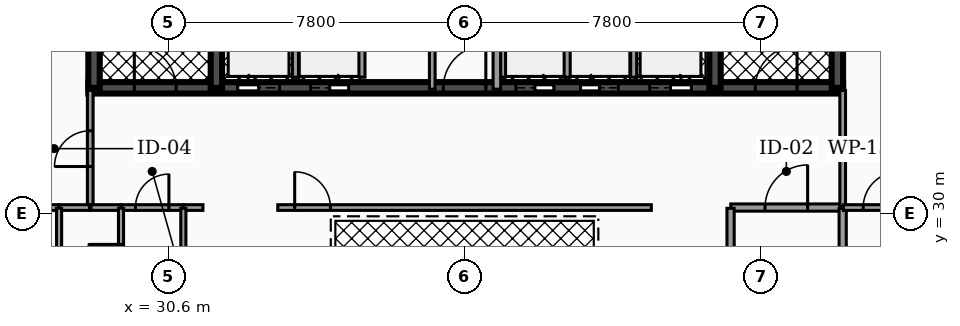
"""IFC4 building model, lengths in metres.
Left out: names, types, materials, properties, quantities, classifications, styles, units other than length and angle.
Written with IfcOpenShell. Run it as: python <this file> out.ifc"""

import sys

from ifc_helpers import new_model, si_unit, direction, frame, frame_2d, origin, place, context, subcontext, project, spatial, rectangle, extrude, element, fill, save


model = new_model("IFC4")
c1 = context("Model", 3, precision=1e-05, world=origin(), true_north=direction((0.0, 1.0)))
c2 = subcontext(c1, "Body", "Model", "MODEL_VIEW")
j1 = project(units=[si_unit("LENGTHUNIT", "METRE"), si_unit("PLANEANGLEUNIT", "RADIAN")], contexts=[c1])
p1 = place(None, origin())
s1 = spatial("IfcSite", under=j1, at=p1, CompositionType="ELEMENT")
p2 = place(p1, origin())
s2 = spatial("IfcBuilding", under=s1, at=p2, CompositionType="ELEMENT")
p3 = place(p2, frame((0.0, 0.0, 212.16)))
s3 = spatial("IfcBuildingStorey", under=s2, at=p3, CompositionType="ELEMENT", Elevation=212.16)
p4 = place(p3, frame((28.5, 33.3, 0.0), z_axis=(0.0, 0.0, 1.0), x_axis=(1.0, 0.0, 0.0)))
e1 = element("IfcWall", 1, at=p4, inside=s3, PredefinedType="SHEAR", context=c2, shape_type="SweptSolid", body=[
    extrude(rectangle(XDim=19.86, YDim=0.3, at=frame_2d((9.93, 0.0))), origin(), (0.0, 0.0, 1.0), 3.18),
])
p5 = place(p4, frame((3.93, 0.0, 0.0)))
e2 = element("IfcOpeningElement", 2, at=p5, cuts=e1, PredefinedType="OPENING", context=c2, shape_type="SweptSolid", body=[
    extrude(rectangle(XDim=1.1, YDim=2.15, at=frame_2d((0.55, 1.075))), frame((0.0, 0.16, 0.0), z_axis=(0.0, -1.0, 0.0), x_axis=(1.0, 0.0, 0.0)), (0.0, 0.0, 1.0), 0.32),
])
p6 = place(p4, frame((14.77, 0.0, 0.0)))
e3 = element("IfcOpeningElement", 3, at=p6, cuts=e1, PredefinedType="OPENING", context=c2, shape_type="SweptSolid", body=[
    extrude(rectangle(XDim=1.1, YDim=2.15, at=frame_2d((0.55, 1.075))), frame((0.0, 0.16, 0.0), z_axis=(0.0, -1.0, 0.0), x_axis=(1.0, 0.0, 0.0)), (0.0, 0.0, 1.0), 0.32),
])
p7 = place(p4, frame((11.25, 0.0, 0.0)))
e4 = element("IfcOpeningElement", 4, at=p7, cuts=e1, PredefinedType="OPENING", context=c2, shape_type="SweptSolid", body=[
    extrude(rectangle(XDim=1.0, YDim=2.1, at=frame_2d((0.5, 1.05))), frame((0.0, 0.16, 0.0), z_axis=(0.0, -1.0, 0.0), x_axis=(1.0, 0.0, 0.0)), (0.0, 0.0, 1.0), 0.32),
])
p8 = place(p4, frame((12.95, 0.0, 0.0)))
e5 = element("IfcOpeningElement", 5, at=p8, cuts=e1, PredefinedType="OPENING", context=c2, shape_type="SweptSolid", body=[
    extrude(rectangle(XDim=1.0, YDim=2.1, at=frame_2d((0.5, 1.05))), frame((0.0, 0.16, 0.0), z_axis=(0.0, -1.0, 0.0), x_axis=(1.0, 0.0, 0.0)), (0.0, 0.0, 1.0), 0.32),
])
p9 = place(p4, frame((5.85, 0.0, 0.0)))
e6 = element("IfcOpeningElement", 6, at=p9, cuts=e1, PredefinedType="OPENING", context=c2, shape_type="SweptSolid", body=[
    extrude(rectangle(XDim=1.0, YDim=2.1, at=frame_2d((0.5, 1.05))), frame((0.0, 0.16, 0.0), z_axis=(0.0, -1.0, 0.0), x_axis=(1.0, 0.0, 0.0)), (0.0, 0.0, 1.0), 0.32),
])
p10 = place(p4, frame((1.21, 0.0, 0.0)))
e7 = element("IfcOpeningElement", 7, at=p10, cuts=e1, PredefinedType="OPENING", context=c2, shape_type="SweptSolid", body=[
    extrude(rectangle(XDim=1.1, YDim=2.2, at=frame_2d((0.55, 1.1))), frame((0.0, 0.16, 0.0), z_axis=(0.0, -1.0, 0.0), x_axis=(1.0, 0.0, 0.0)), (0.0, 0.0, 1.0), 0.32),
])
p11 = place(p4, frame((9.34, 0.0, 0.0)))
e8 = element("IfcOpeningElement", 8, at=p11, cuts=e1, PredefinedType="OPENING", context=c2, shape_type="SweptSolid", body=[
    extrude(rectangle(XDim=1.12, YDim=2.05, at=frame_2d((0.56, 1.025))), frame((0.0, 0.16, 0.0), z_axis=(0.0, -1.0, 0.0), x_axis=(1.0, 0.0, 0.0)), (0.0, 0.0, 1.0), 0.32),
])
p12 = place(p4, frame((17.55, 0.0, 0.0)))
e9 = element("IfcOpeningElement", 9, at=p12, cuts=e1, PredefinedType="OPENING", context=c2, shape_type="SweptSolid", body=[
    extrude(rectangle(XDim=1.1, YDim=2.2, at=frame_2d((0.55, 1.1))), frame((0.0, 0.16, 0.0), z_axis=(0.0, -1.0, 0.0), x_axis=(1.0, 0.0, 0.0)), (0.0, 0.0, 1.0), 0.32),
])
for number, where, z_axis, x_axis in (
    (10, (28.65, 33.3, 0.0), (0.0, 0.0, 1.0), (0.0, 1.0, 0.0)),
    (11, (31.87, 33.3, 0.0), (0.0, 0.0, 1.0), (0.0, 1.0, 0.0)),
    (12, (44.99, 33.3, 0.0), (0.0, 0.0, 1.0), (0.0, 1.0, 0.0)),
    (13, (48.21, 33.3, 0.0), (0.0, 0.0, 1.0), (0.0, 1.0, 0.0)),
):
    element("IfcWall", number, at=place(p3, frame(where, z_axis=z_axis, x_axis=x_axis)), inside=s3, PredefinedType="SHEAR", context=c2, shape_type="SweptSolid", body=[
        extrude(rectangle(XDim=10.1, YDim=0.3, at=frame_2d((5.05, 0.0))), origin(), (0.0, 0.0, 1.0), 3.18),
    ])
for number, where, z_axis, x_axis in (
    (14, (33.95, 33.58, 0.0), (0.0, 0.0, 1.0), (0.0, 1.0, 0.0)),
    (15, (42.85, 33.58, 0.0), (0.0, 0.0, 1.0), (0.0, 1.0, 0.0)),
):
    element("IfcWall", number, at=place(p3, frame(where, z_axis=z_axis, x_axis=x_axis)), inside=s3, PredefinedType="SOLIDWALL", context=c2, shape_type="SweptSolid", body=[
        extrude(rectangle(XDim=2.45, YDim=0.16, at=frame_2d((1.225, 0.0))), origin(), (0.0, 0.0, 1.0), 3.18),
    ])
for number, where, z_axis, x_axis in (
    (16, (39.4, 33.58, 0.0), (0.0, 0.0, 1.0), (0.0, 1.0, 0.0)),
    (17, (41.1, 33.58, 0.0), (0.0, 0.0, 1.0), (0.0, 1.0, 0.0)),
    (18, (35.7, 33.58, 0.0), (0.0, 0.0, 1.0), (0.0, 1.0, 0.0)),
):
    element("IfcWall", number, at=place(p3, frame(where, z_axis=z_axis, x_axis=x_axis)), inside=s3, PredefinedType="SOLIDWALL", context=c2, shape_type="SweptSolid", body=[
        extrude(rectangle(XDim=2.25, YDim=0.16, at=frame_2d((1.125, 0.0))), origin(), (0.0, 0.0, 1.0), 3.18),
    ])
p13 = place(p3, frame((37.55, 33.265, 0.0), z_axis=(0.0, 0.0, 1.0), x_axis=(0.0, 1.0, 0.0)))
e19 = element("IfcWall", 19, at=p13, inside=s3, PredefinedType="PARTITIONING", context=c2, shape_type="SweptSolid", body=[
    extrude(rectangle(XDim=3.615, YDim=0.15, at=frame_2d((1.808, 0.0))), origin(), (0.0, 0.0, 1.0), 2.235),
])
p14 = place(p13, frame((1.337, 0.0, 0.0)))
e20 = element("IfcOpeningElement", 20, at=p14, cuts=e19, PredefinedType="OPENING", context=c2, shape_type="SweptSolid", body=[
    extrude(rectangle(XDim=0.94, YDim=2.05, at=frame_2d((0.47, 1.025))), frame((0.0, 0.085, 0.0), z_axis=(0.0, -1.0, 0.0), x_axis=(1.0, 0.0, 0.0)), (0.0, 0.0, 1.0), 0.17),
])
p15 = place(p3, frame((39.25, 33.265, 0.0), z_axis=(0.0, 0.0, 1.0), x_axis=(0.0, 1.0, 0.0)))
e21 = element("IfcWall", 21, at=p15, inside=s3, PredefinedType="PARTITIONING", context=c2, shape_type="SweptSolid", body=[
    extrude(rectangle(XDim=3.615, YDim=0.2, at=frame_2d((1.808, 0.0))), origin(), (0.0, 0.0, 1.0), 2.235),
])
p16 = place(p3, frame((45.405, 30.15, 0.0), z_axis=(0.0, 0.0, 1.0), x_axis=(1.0, 0.0, 0.0)))
e22 = element("IfcWall", 22, at=p16, inside=s3, PredefinedType="PARTITIONING", context=c2, shape_type="SweptSolid", body=[
    extrude(rectangle(XDim=2.925, YDim=0.19, at=frame_2d((1.462, 0.0))), origin(), (0.0, 0.0, 1.0), 2.235),
])
p17 = place(p16, frame((0.903, 0.0, 0.0)))
e23 = element("IfcOpeningElement", 23, at=p17, cuts=e22, PredefinedType="OPENING", context=c2, shape_type="SweptSolid", body=[
    extrude(rectangle(XDim=1.12, YDim=2.05, at=frame_2d((0.56, 1.025))), frame((0.0, 0.105, 0.0), z_axis=(0.0, -1.0, 0.0), x_axis=(1.0, 0.0, 0.0)), (0.0, 0.0, 1.0), 0.21),
])
p18 = place(p3, frame((28.55, 30.17, 0.0), z_axis=(0.0, 0.0, 1.0), x_axis=(0.0, 1.0, 0.0)))
e24 = element("IfcWall", 24, at=p18, inside=s3, PredefinedType="PARTITIONING", context=c2, shape_type="SweptSolid", body=[
    extrude(rectangle(XDim=3.06, YDim=0.15, at=frame_2d((1.53, 0.0))), origin(), (0.0, 0.0, 1.0), 2.235),
])
p19 = place(p18, frame((1.06, 0.0, 0.0)))
e25 = element("IfcOpeningElement", 25, at=p19, cuts=e24, PredefinedType="OPENING", context=c2, shape_type="SweptSolid", body=[
    extrude(rectangle(XDim=0.94, YDim=2.05, at=frame_2d((0.47, 1.025))), frame((0.0, 0.085, 0.0), z_axis=(0.0, -1.0, 0.0), x_axis=(1.0, 0.0, 0.0)), (0.0, 0.0, 1.0), 0.17),
])
p20 = place(p3, frame((48.35, 30.17, 0.0), z_axis=(0.0, 0.0, 1.0), x_axis=(0.0, 1.0, 0.0)))
e26 = element("IfcWall", 26, at=p20, inside=s3, PredefinedType="PARTITIONING", context=c2, shape_type="SweptSolid", body=[
    extrude(rectangle(XDim=3.06, YDim=0.15, at=frame_2d((1.53, 0.0))), origin(), (0.0, 0.0, 1.0), 2.235),
])
p21 = place(p3, frame((29.365, 30.15, 0.0), z_axis=(0.0, 0.0, 1.0), x_axis=(1.0, 0.0, 0.0)))
e27 = element("IfcWall", 27, at=p21, inside=s3, PredefinedType="PARTITIONING", context=c2, shape_type="SweptSolid", body=[
    extrude(rectangle(XDim=1.63, YDim=0.15, at=frame_2d((0.815, 0.0))), origin(), (0.0, 0.0, 1.0), 2.235),
])
p22 = place(p21, frame((0.375, 0.0, 0.0)))
e28 = element("IfcOpeningElement", 28, at=p22, cuts=e27, PredefinedType="OPENING", context=c2, shape_type="SweptSolid", body=[
    extrude(rectangle(XDim=0.88, YDim=2.05, at=frame_2d((0.44, 1.025))), frame((0.0, 0.085, 0.0), z_axis=(0.0, -1.0, 0.0), x_axis=(1.0, 0.0, 0.0)), (0.0, 0.0, 1.0), 0.17),
])
p23 = place(p3, frame((28.57, 30.15, 0.0), z_axis=(0.0, 0.0, 1.0), x_axis=(1.0, 0.0, 0.0)))
e29 = element("IfcWall", 29, at=p23, inside=s3, PredefinedType="PARTITIONING", context=c2, shape_type="SweptSolid", body=[
    extrude(rectangle(XDim=0.785, YDim=0.15, at=frame_2d((0.393, 0.0))), origin(), (0.0, 0.0, 1.0), 2.235),
])
p24 = place(p3, frame((33.485, 30.15, 0.0), z_axis=(0.0, 0.0, 1.0), x_axis=(1.0, 0.0, 0.0)))
e30 = element("IfcWall", 30, at=p24, inside=s3, PredefinedType="PARTITIONING", context=c2, shape_type="SweptSolid", body=[
    extrude(rectangle(XDim=9.83, YDim=0.15, at=frame_2d((4.915, 0.0))), origin(), (0.0, 0.0, 1.0), 2.235),
])
p25 = place(p24, frame((0.445, 0.0, 0.0)))
e31 = element("IfcOpeningElement", 31, at=p25, cuts=e30, PredefinedType="OPENING", context=c2, shape_type="SweptSolid", body=[
    extrude(rectangle(XDim=0.94, YDim=2.05, at=frame_2d((0.47, 1.025))), frame((0.0, 0.085, 0.0), z_axis=(0.0, -1.0, 0.0), x_axis=(1.0, 0.0, 0.0)), (0.0, 0.0, 1.0), 0.17),
])
p26 = place(p3, frame((31.005, 30.15, 0.0), z_axis=(0.0, 0.0, 1.0), x_axis=(1.0, 0.0, 0.0)))
e32 = element("IfcWall", 32, at=p26, inside=s3, PredefinedType="PARTITIONING", context=c2, shape_type="SweptSolid", body=[
    extrude(rectangle(XDim=0.51, YDim=0.15, at=frame_2d((0.255, 0.0))), origin(), (0.0, 0.0, 1.0), 2.235),
])
for number, where, z_axis, x_axis in (
    (33, (45.4, 27.37, 0.0), (0.0, 0.0, 1.0), (0.0, 1.0, 0.0)),
    (34, (48.35, 27.37, 0.0), (0.0, 0.0, 1.0), (0.0, 1.0, 0.0)),
):
    element("IfcWall", number, at=place(p3, frame(where, z_axis=z_axis, x_axis=x_axis)), inside=s3, PredefinedType="PARTITIONING", context=c2, shape_type="SweptSolid", body=[
        extrude(rectangle(XDim=2.76, YDim=0.19, at=frame_2d((1.38, 0.0))), origin(), (0.0, 0.0, 1.0), 2.235),
    ])
p27 = place(p3, frame((26.55, 30.15, 0.0), z_axis=(0.0, 0.0, 1.0), x_axis=(1.0, 0.0, 0.0)))
e35 = element("IfcWall", 35, at=p27, inside=s3, PredefinedType="PARTITIONING", context=c2, shape_type="SweptSolid", body=[
    extrude(rectangle(XDim=1.175, YDim=0.15, at=frame_2d((0.587, 0.0))), origin(), (0.0, 0.0, 1.0), 2.235),
])
p28 = place(p3, frame((27.735, 30.15, 0.0), z_axis=(0.0, 0.0, 1.0), x_axis=(1.0, 0.0, 0.0)))
e36 = element("IfcWall", 36, at=p28, inside=s3, PredefinedType="PARTITIONING", context=c2, shape_type="SweptSolid", body=[
    extrude(rectangle(XDim=0.795, YDim=0.15, at=frame_2d((0.397, 0.0))), origin(), (0.0, 0.0, 1.0), 2.235),
])
p29 = place(p3, frame((48.37, 30.15, 0.0), z_axis=(0.0, 0.0, 1.0), x_axis=(1.0, 0.0, 0.0)))
e37 = element("IfcWall", 37, at=p29, inside=s3, PredefinedType="PARTITIONING", context=c2, shape_type="SweptSolid", body=[
    extrude(rectangle(XDim=1.98, YDim=0.15, at=frame_2d((0.99, 0.0))), origin(), (0.0, 0.0, 1.0), 2.235),
])
p30 = place(p29, frame((0.52, 0.0, 0.0)))
e38 = element("IfcOpeningElement", 38, at=p30, cuts=e37, PredefinedType="OPENING", context=c2, shape_type="SweptSolid", body=[
    extrude(rectangle(XDim=0.94, YDim=2.05, at=frame_2d((0.47, 1.025))), frame((0.0, 0.085, 0.0), z_axis=(0.0, -1.0, 0.0), x_axis=(1.0, 0.0, 0.0)), (0.0, 0.0, 1.0), 0.17),
])
p31 = place(p3, frame((29.36, 27.37, 0.0), z_axis=(0.0, 0.0, 1.0), x_axis=(0.0, 1.0, 0.0)))
e39 = element("IfcWall", 39, at=p31, inside=s3, PredefinedType="PARTITIONING", context=c2, shape_type="SweptSolid", body=[
    extrude(rectangle(XDim=2.76, YDim=0.135, at=frame_2d((1.38, 0.0))), origin(), (0.0, 0.0, 1.0), 2.235),
])
p32 = place(p31, frame((0.95, 0.0, 0.0)))
e40 = element("IfcOpeningElement", 40, at=p32, cuts=e39, PredefinedType="OPENING", context=c2, shape_type="SweptSolid", body=[
    extrude(rectangle(XDim=0.86, YDim=2.05, at=frame_2d((0.43, 1.025))), frame((0.0, 0.077, 0.0), z_axis=(0.0, -1.0, 0.0), x_axis=(1.0, 0.0, 0.0)), (0.0, 0.0, 1.0), 0.155),
])
for number, where, z_axis, x_axis in (
    (41, (31.0, 27.37, 0.0), (0.0, 0.0, 1.0), (0.0, 1.0, 0.0)),
    (42, (27.73, 27.37, 0.0), (0.0, 0.0, 1.0), (0.0, 1.0, 0.0)),
):
    element("IfcWall", number, at=place(p3, frame(where, z_axis=z_axis, x_axis=x_axis)), inside=s3, PredefinedType="PARTITIONING", context=c2, shape_type="SweptSolid", body=[
        extrude(rectangle(XDim=2.76, YDim=0.135, at=frame_2d((1.38, 0.0))), origin(), (0.0, 0.0, 1.0), 2.235),
    ])
p33 = place(p5, origin())
e43 = element("IfcDoor", 43, at=p33, inside=s3, OperationType="SLIDING_TO_LEFT", PredefinedType="DOOR", context=c2, shape_type="SweptSolid", body=[
    extrude(rectangle(XDim=1.1, YDim=2.15, at=frame_2d((0.55, 1.075))), frame((0.0, 0.025, 0.0), z_axis=(0.0, -1.0, 0.0), x_axis=(1.0, 0.0, 0.0)), (0.0, 0.0, 1.0), 0.05),
])
fill(e2, e43)
p34 = place(p6, origin())
e44 = element("IfcDoor", 44, at=p34, inside=s3, OperationType="SLIDING_TO_RIGHT", PredefinedType="DOOR", context=c2, shape_type="SweptSolid", body=[
    extrude(rectangle(XDim=1.1, YDim=2.15, at=frame_2d((0.55, 1.075))), frame((0.0, 0.025, 0.0), z_axis=(0.0, -1.0, 0.0), x_axis=(1.0, 0.0, 0.0)), (0.0, 0.0, 1.0), 0.05),
])
fill(e3, e44)
p35 = place(p7, origin())
e45 = element("IfcDoor", 45, at=p35, inside=s3, OperationType="SLIDING_TO_RIGHT", PredefinedType="DOOR", context=c2, shape_type="SweptSolid", body=[
    extrude(rectangle(XDim=1.0, YDim=2.1, at=frame_2d((0.5, 1.05))), frame((0.0, 0.025, 0.0), z_axis=(0.0, -1.0, 0.0), x_axis=(1.0, 0.0, 0.0)), (0.0, 0.0, 1.0), 0.05),
])
fill(e4, e45)
p36 = place(p8, origin())
e46 = element("IfcDoor", 46, at=p36, inside=s3, OperationType="SLIDING_TO_LEFT", PredefinedType="DOOR", context=c2, shape_type="SweptSolid", body=[
    extrude(rectangle(XDim=1.0, YDim=2.1, at=frame_2d((0.5, 1.05))), frame((0.0, 0.025, 0.0), z_axis=(0.0, -1.0, 0.0), x_axis=(1.0, 0.0, 0.0)), (0.0, 0.0, 1.0), 0.05),
])
fill(e5, e46)
p37 = place(p9, origin())
e47 = element("IfcDoor", 47, at=p37, inside=s3, OperationType="SLIDING_TO_RIGHT", PredefinedType="DOOR", context=c2, shape_type="SweptSolid", body=[
    extrude(rectangle(XDim=1.0, YDim=2.1, at=frame_2d((0.5, 1.05))), frame((0.0, 0.025, 0.0), z_axis=(0.0, -1.0, 0.0), x_axis=(1.0, 0.0, 0.0)), (0.0, 0.0, 1.0), 0.05),
])
fill(e6, e47)
p38 = place(p10, origin())
e48 = element("IfcDoor", 48, at=p38, inside=s3, OperationType="SINGLE_SWING_LEFT", PredefinedType="DOOR", context=c2, shape_type="SweptSolid", body=[
    extrude(rectangle(XDim=1.1, YDim=2.2, at=frame_2d((0.55, 1.1))), frame((0.0, 0.025, 0.0), z_axis=(0.0, -1.0, 0.0), x_axis=(1.0, 0.0, 0.0)), (0.0, 0.0, 1.0), 0.05),
])
fill(e7, e48)
p39 = place(p11, origin())
e49 = element("IfcDoor", 49, at=p39, inside=s3, OperationType="SINGLE_SWING_RIGHT", PredefinedType="DOOR", context=c2, shape_type="SweptSolid", body=[
    extrude(rectangle(XDim=1.12, YDim=2.05, at=frame_2d((0.56, 1.025))), frame((0.0, 0.025, 0.0), z_axis=(0.0, -1.0, 0.0), x_axis=(1.0, 0.0, 0.0)), (0.0, 0.0, 1.0), 0.05),
])
fill(e8, e49)
p40 = place(p12, origin())
e50 = element("IfcDoor", 50, at=p40, inside=s3, OperationType="SINGLE_SWING_RIGHT", PredefinedType="DOOR", context=c2, shape_type="SweptSolid", body=[
    extrude(rectangle(XDim=1.1, YDim=2.2, at=frame_2d((0.55, 1.1))), frame((0.0, 0.025, 0.0), z_axis=(0.0, -1.0, 0.0), x_axis=(1.0, 0.0, 0.0)), (0.0, 0.0, 1.0), 0.05),
])
fill(e9, e50)
p41 = place(p17, origin())
e51 = element("IfcDoor", 51, at=p41, inside=s3, OperationType="SINGLE_SWING_RIGHT", PredefinedType="DOOR", context=c2, shape_type="SweptSolid", body=[
    extrude(rectangle(XDim=1.12, YDim=2.05, at=frame_2d((0.56, 1.025))), frame((0.0, 0.025, 0.0), z_axis=(0.0, -1.0, 0.0), x_axis=(1.0, 0.0, 0.0)), (0.0, 0.0, 1.0), 0.05),
])
fill(e23, e51)
p42 = place(p19, origin())
e52 = element("IfcDoor", 52, at=p42, inside=s3, OperationType="SINGLE_SWING_LEFT", PredefinedType="DOOR", context=c2, shape_type="SweptSolid", body=[
    extrude(rectangle(XDim=0.94, YDim=2.05, at=frame_2d((0.47, 1.025))), frame((0.0, 0.025, 0.0), z_axis=(0.0, -1.0, 0.0), x_axis=(1.0, 0.0, 0.0)), (0.0, 0.0, 1.0), 0.05),
])
fill(e25, e52)
p43 = place(p22, origin())
e53 = element("IfcDoor", 53, at=p43, inside=s3, OperationType="SINGLE_SWING_RIGHT", PredefinedType="DOOR", context=c2, shape_type="SweptSolid", body=[
    extrude(rectangle(XDim=0.88, YDim=2.05, at=frame_2d((0.44, 1.025))), frame((0.0, 0.025, 0.0), z_axis=(0.0, -1.0, 0.0), x_axis=(1.0, 0.0, 0.0)), (0.0, 0.0, 1.0), 0.05),
])
fill(e28, e53)
p44 = place(p25, origin())
e54 = element("IfcDoor", 54, at=p44, inside=s3, OperationType="SINGLE_SWING_LEFT", PredefinedType="DOOR", context=c2, shape_type="SweptSolid", body=[
    extrude(rectangle(XDim=0.94, YDim=2.05, at=frame_2d((0.47, 1.025))), frame((0.0, 0.025, 0.0), z_axis=(0.0, -1.0, 0.0), x_axis=(1.0, 0.0, 0.0)), (0.0, 0.0, 1.0), 0.05),
])
fill(e31, e54)
p45 = place(p30, origin())
e55 = element("IfcDoor", 55, at=p45, inside=s3, OperationType="SINGLE_SWING_RIGHT", PredefinedType="DOOR", context=c2, shape_type="SweptSolid", body=[
    extrude(rectangle(XDim=0.94, YDim=2.05, at=frame_2d((0.47, 1.025))), frame((0.0, 0.025, 0.0), z_axis=(0.0, -1.0, 0.0), x_axis=(1.0, 0.0, 0.0)), (0.0, 0.0, 1.0), 0.05),
])
fill(e38, e55)
p46 = place(p32, origin())
e56 = element("IfcDoor", 56, at=p46, inside=s3, OperationType="SINGLE_SWING_RIGHT", PredefinedType="DOOR", context=c2, shape_type="SweptSolid", body=[
    extrude(rectangle(XDim=0.86, YDim=2.05, at=frame_2d((0.43, 1.025))), frame((0.0, 0.025, 0.0), z_axis=(0.0, -1.0, 0.0), x_axis=(1.0, 0.0, 0.0)), (0.0, 0.0, 1.0), 0.05),
])
fill(e40, e56)
save(model, sys.argv[1])
